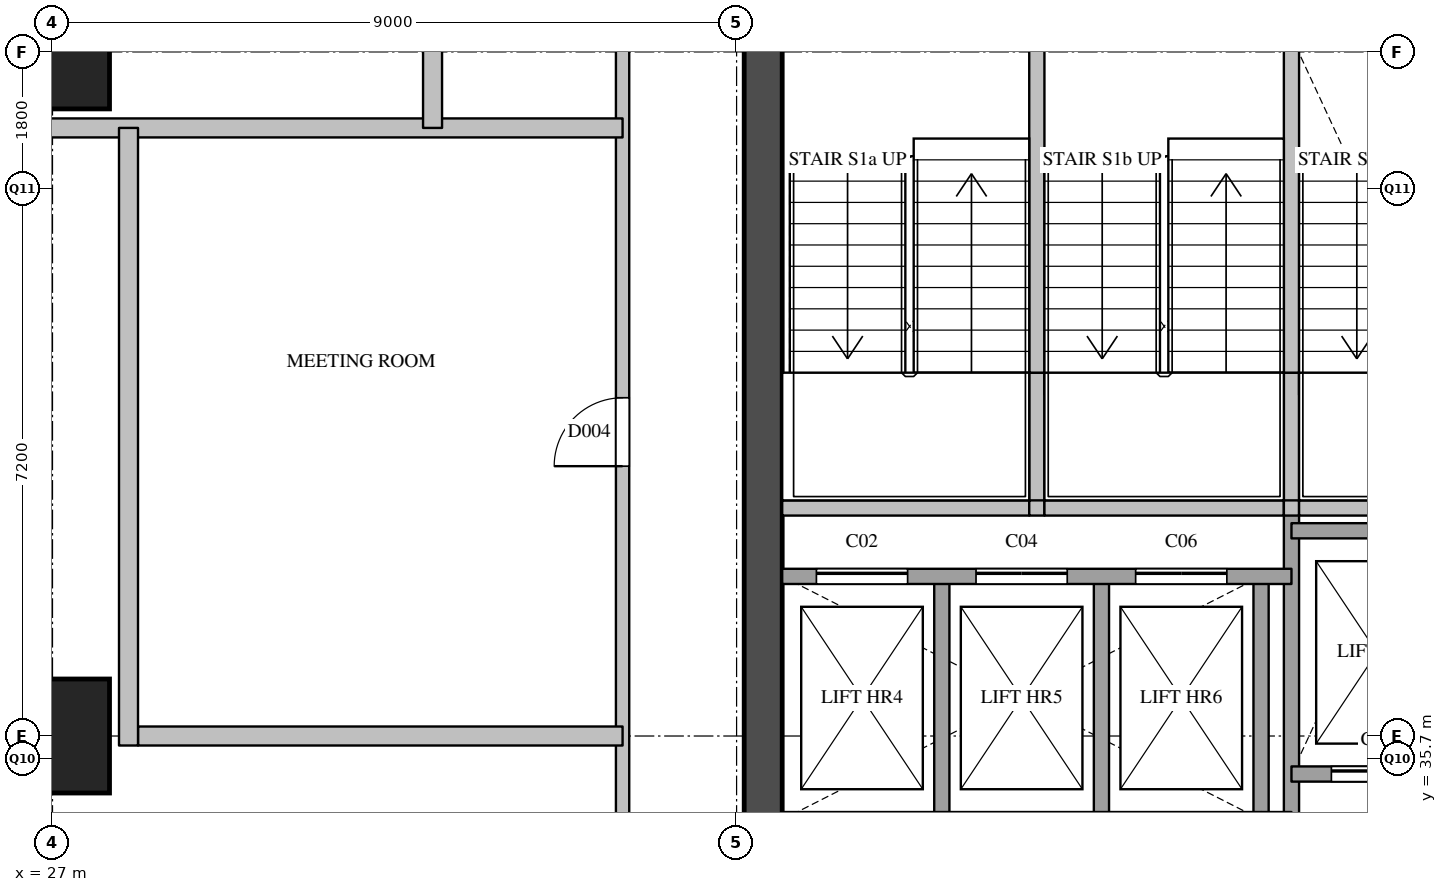
"""IFC4 building model, lengths in metres.
Left out: names, types, materials, properties, quantities, classifications, styles, units other than length and angle.
Written with IfcOpenShell. Run it as: python <this file> out.ifc"""

import sys

from ifc_helpers import new_model, si_unit, direction, frame, frame_2d, origin, origin_2d, place, context, subcontext, project, spatial, rectangle, extrude, element, fill, save


model = new_model("IFC4")
c1 = context("Model", 3, precision=1e-05, world=origin(), true_north=direction((0.0, 1.0)))
c2 = subcontext(c1, "Body", "Model", "MODEL_VIEW")
j1 = project(units=[si_unit("LENGTHUNIT", "METRE"), si_unit("PLANEANGLEUNIT", "RADIAN")], contexts=[c1])
p1 = place(None, origin())
s1 = spatial("IfcSite", under=j1, at=p1, CompositionType="ELEMENT")
p2 = place(p1, origin())
s2 = spatial("IfcBuilding", under=s1, at=p2, CompositionType="ELEMENT")
p3 = place(p2, frame((0.0, 0.0, 138.8)))
s3 = spatial("IfcBuildingStorey", under=s2, at=p3, CompositionType="ELEMENT", Elevation=138.8)
for number, where, z_axis, x_axis in (
    (1, (27.0, 36.0, 0.0), (0.0, 0.0, 1.0), (1.0, 0.0, 0.0)),
    (2, (27.0, 45.0, 0.0), (0.0, 0.0, 1.0), (1.0, 0.0, 0.0)),
):
    element("IfcColumn", number, at=place(p3, frame(where, z_axis=z_axis, x_axis=x_axis)), inside=s3, PredefinedType="COLUMN", context=c2, shape_type="SweptSolid", body=[
        extrude(rectangle(XDim=1.5, YDim=1.5, at=origin_2d()), origin(), (0.0, 0.0, 1.0), 3.9),
    ])
p4 = place(p3, frame((36.35, 29.1, 0.0), z_axis=(0.0, 0.0, 1.0), x_axis=(0.0, 1.0, 0.0)))
e3 = element("IfcWall", 3, at=p4, inside=s3, PredefinedType="SHEAR", context=c2, shape_type="SweptSolid", body=[
    extrude(rectangle(XDim=20.3, YDim=0.5, at=frame_2d((10.15, 0.0))), origin(), (0.0, 0.0, 1.0), 3.6),
])
p5 = place(p4, frame((3.6, 0.0, 0.0)))
e4 = element("IfcOpeningElement", 4, at=p5, cuts=e3, PredefinedType="OPENING", context=c2, shape_type="SweptSolid", body=[
    extrude(rectangle(XDim=1.8, YDim=2.1, at=frame_2d((0.9, 1.05))), frame((0.0, 0.26, 0.0), z_axis=(0.0, -1.0, 0.0), x_axis=(1.0, 0.0, 0.0)), (0.0, 0.0, 1.0), 0.52),
])
p6 = place(p4, frame((16.4, 0.0, 0.0)))
e5 = element("IfcOpeningElement", 5, at=p6, cuts=e3, PredefinedType="OPENING", context=c2, shape_type="SweptSolid", body=[
    extrude(rectangle(XDim=1.0, YDim=2.1, at=frame_2d((0.5, 1.05))), frame((0.0, 0.26, 0.0), z_axis=(0.0, -1.0, 0.0), x_axis=(1.0, 0.0, 0.0)), (0.0, 0.0, 1.0), 0.52),
])
p7 = place(p3, frame((38.7, 34.9, 0.0), z_axis=(0.0, 0.0, 1.0), x_axis=(0.0, 1.0, 0.0)))
e6 = element("IfcWall", 6, at=p7, inside=s3, PredefinedType="SOLIDWALL", context=c2, shape_type="SweptSolid", body=[
    extrude(rectangle(XDim=3.2, YDim=0.2, at=frame_2d((1.6, 0.0))), origin(), (0.0, 0.0, 1.0), 3.6),
])
p8 = place(p3, frame((39.95, 39.0, 0.0), z_axis=(0.0, 0.0, 1.0), x_axis=(0.0, 1.0, 0.0)))
e7 = element("IfcWall", 7, at=p8, inside=s3, PredefinedType="SOLIDWALL", context=c2, shape_type="SweptSolid", body=[
    extrude(rectangle(XDim=1.78, YDim=0.2, at=frame_2d((0.89, 0.0))), origin(), (0.0, 0.0, 1.0), 3.6),
])
p9 = place(p3, frame((39.95, 40.78, 0.0), z_axis=(0.0, 0.0, 1.0), x_axis=(0.0, 1.0, 0.0)))
e8 = element("IfcWall", 8, at=p9, inside=s3, PredefinedType="SOLIDWALL", context=c2, shape_type="SweptSolid", body=[
    extrude(rectangle(XDim=4.42, YDim=0.2, at=frame_2d((2.21, 0.0))), origin(), (0.0, 0.0, 1.0), 3.6),
])
for number, where, z_axis, x_axis in (
    (9, (40.8, 34.9, 0.0), (0.0, 0.0, 1.0), (0.0, 1.0, 0.0)),
    (10, (42.9, 34.9, 0.0), (0.0, 0.0, 1.0), (0.0, 1.0, 0.0)),
):
    element("IfcWall", number, at=place(p3, frame(where, z_axis=z_axis, x_axis=x_axis)), inside=s3, PredefinedType="SOLIDWALL", context=c2, shape_type="SweptSolid", body=[
        extrude(rectangle(XDim=3.2, YDim=0.2, at=frame_2d((1.6, 0.0))), origin(), (0.0, 0.0, 1.0), 3.6),
    ])
p10 = place(p3, frame((43.3, 29.1, 0.0), z_axis=(0.0, 0.0, 1.0), x_axis=(0.0, 1.0, 0.0)))
e11 = element("IfcWall", 11, at=p10, inside=s3, PredefinedType="SOLIDWALL", context=c2, shape_type="SweptSolid", body=[
    extrude(rectangle(XDim=9.9, YDim=0.2, at=frame_2d((4.95, 0.0))), origin(), (0.0, 0.0, 1.0), 3.6),
])
p11 = place(p3, frame((43.3, 39.0, 0.0), z_axis=(0.0, 0.0, 1.0), x_axis=(0.0, 1.0, 0.0)))
e12 = element("IfcWall", 12, at=p11, inside=s3, PredefinedType="SOLIDWALL", context=c2, shape_type="SweptSolid", body=[
    extrude(rectangle(XDim=1.78, YDim=0.2, at=frame_2d((0.89, 0.0))), origin(), (0.0, 0.0, 1.0), 3.6),
])
p12 = place(p3, frame((43.3, 40.78, 0.0), z_axis=(0.0, 0.0, 1.0), x_axis=(0.0, 1.0, 0.0)))
e13 = element("IfcWall", 13, at=p12, inside=s3, PredefinedType="SOLIDWALL", context=c2, shape_type="SweptSolid", body=[
    extrude(rectangle(XDim=4.42, YDim=0.2, at=frame_2d((2.21, 0.0))), origin(), (0.0, 0.0, 1.0), 3.6),
])
p13 = place(p3, frame((43.3, 35.5, 0.0), z_axis=(0.0, 0.0, 1.0), x_axis=(1.0, 0.0, 0.0)))
e14 = element("IfcWall", 14, at=p13, inside=s3, PredefinedType="SOLIDWALL", context=c2, shape_type="SweptSolid", body=[
    extrude(rectangle(XDim=4.5, YDim=0.2, at=frame_2d((2.25, 0.0))), origin(), (0.0, 0.0, 1.0), 3.6),
])
p14 = place(p13, frame((0.525, 0.0, 0.0)))
e15 = element("IfcOpeningElement", 15, at=p14, cuts=e14, PredefinedType="OPENING", context=c2, shape_type="SweptSolid", body=[
    extrude(rectangle(XDim=1.2, YDim=2.1, at=frame_2d((0.6, 1.05))), frame((0.0, 0.11, 0.0), z_axis=(0.0, -1.0, 0.0), x_axis=(1.0, 0.0, 0.0)), (0.0, 0.0, 1.0), 0.22),
])
p15 = place(p13, frame((3.025, 0.0, 0.0)))
e16 = element("IfcOpeningElement", 16, at=p15, cuts=e14, PredefinedType="OPENING", context=c2, shape_type="SweptSolid", body=[
    extrude(rectangle(XDim=0.7, YDim=2.1, at=frame_2d((0.35, 1.05))), frame((0.0, 0.11, 0.0), z_axis=(0.0, -1.0, 0.0), x_axis=(1.0, 0.0, 0.0)), (0.0, 0.0, 1.0), 0.22),
])
p16 = place(p3, frame((36.6, 38.1, 0.0), z_axis=(0.0, 0.0, 1.0), x_axis=(1.0, 0.0, 0.0)))
e17 = element("IfcWall", 17, at=p16, inside=s3, PredefinedType="SOLIDWALL", context=c2, shape_type="SweptSolid", body=[
    extrude(rectangle(XDim=6.7, YDim=0.2, at=frame_2d((3.35, 0.0))), origin(), (0.0, 0.0, 1.0), 3.6),
])
p17 = place(p16, frame((0.45, 0.0, 0.0)))
e18 = element("IfcOpeningElement", 18, at=p17, cuts=e17, PredefinedType="OPENING", context=c2, shape_type="SweptSolid", body=[
    extrude(rectangle(XDim=1.2, YDim=2.1, at=frame_2d((0.6, 1.05))), frame((0.0, 0.11, 0.0), z_axis=(0.0, -1.0, 0.0), x_axis=(1.0, 0.0, 0.0)), (0.0, 0.0, 1.0), 0.22),
])
p18 = place(p16, frame((2.55, 0.0, 0.0)))
e19 = element("IfcOpeningElement", 19, at=p18, cuts=e17, PredefinedType="OPENING", context=c2, shape_type="SweptSolid", body=[
    extrude(rectangle(XDim=1.2, YDim=2.1, at=frame_2d((0.6, 1.05))), frame((0.0, 0.11, 0.0), z_axis=(0.0, -1.0, 0.0), x_axis=(1.0, 0.0, 0.0)), (0.0, 0.0, 1.0), 0.22),
])
p19 = place(p16, frame((4.65, 0.0, 0.0)))
e20 = element("IfcOpeningElement", 20, at=p19, cuts=e17, PredefinedType="OPENING", context=c2, shape_type="SweptSolid", body=[
    extrude(rectangle(XDim=1.2, YDim=2.1, at=frame_2d((0.6, 1.05))), frame((0.0, 0.11, 0.0), z_axis=(0.0, -1.0, 0.0), x_axis=(1.0, 0.0, 0.0)), (0.0, 0.0, 1.0), 0.22),
])
p20 = place(p3, frame((43.3, 38.7, 0.0), z_axis=(0.0, 0.0, 1.0), x_axis=(1.0, 0.0, 0.0)))
e21 = element("IfcWall", 21, at=p20, inside=s3, PredefinedType="SOLIDWALL", context=c2, shape_type="SweptSolid", body=[
    extrude(rectangle(XDim=4.5, YDim=0.2, at=frame_2d((2.25, 0.0))), origin(), (0.0, 0.0, 1.0), 3.6),
])
p21 = place(p3, frame((36.6, 39.0, 0.0), z_axis=(0.0, 0.0, 1.0), x_axis=(1.0, 0.0, 0.0)))
e22 = element("IfcWall", 22, at=p21, inside=s3, PredefinedType="SOLIDWALL", context=c2, shape_type="SweptSolid", body=[
    extrude(rectangle(XDim=3.25, YDim=0.2, at=frame_2d((1.625, 0.0))), origin(), (0.0, 0.0, 1.0), 3.6),
])
p22 = place(p3, frame((39.85, 39.0, 0.0), z_axis=(0.0, 0.0, 1.0), x_axis=(1.0, 0.0, 0.0)))
e23 = element("IfcWall", 23, at=p22, inside=s3, PredefinedType="SOLIDWALL", context=c2, shape_type="SweptSolid", body=[
    extrude(rectangle(XDim=0.2, YDim=0.2, at=frame_2d((0.1, 0.0))), origin(), (0.0, 0.0, 1.0), 3.6),
])
p23 = place(p3, frame((40.05, 39.0, 0.0), z_axis=(0.0, 0.0, 1.0), x_axis=(1.0, 0.0, 0.0)))
e24 = element("IfcWall", 24, at=p23, inside=s3, PredefinedType="SOLIDWALL", context=c2, shape_type="SweptSolid", body=[
    extrude(rectangle(XDim=3.15, YDim=0.2, at=frame_2d((1.575, 0.0))), origin(), (0.0, 0.0, 1.0), 3.6),
])
p24 = place(p3, frame((43.2, 39.0, 0.0), z_axis=(0.0, 0.0, 1.0), x_axis=(1.0, 0.0, 0.0)))
e25 = element("IfcWall", 25, at=p24, inside=s3, PredefinedType="SOLIDWALL", context=c2, shape_type="SweptSolid", body=[
    extrude(rectangle(XDim=0.2, YDim=0.2, at=frame_2d((0.1, 0.0))), origin(), (0.0, 0.0, 1.0), 3.6),
])
p25 = place(p3, frame((43.4, 39.0, 0.0), z_axis=(0.0, 0.0, 1.0), x_axis=(1.0, 0.0, 0.0)))
e26 = element("IfcWall", 26, at=p25, inside=s3, PredefinedType="SOLIDWALL", context=c2, shape_type="SweptSolid", body=[
    extrude(rectangle(XDim=3.25, YDim=0.2, at=frame_2d((1.625, 0.0))), origin(), (0.0, 0.0, 1.0), 3.6),
])
p26 = place(p3, frame((34.5, 28.5, 0.0), z_axis=(0.0, 0.0, 1.0), x_axis=(0.0, 1.0, 0.0)))
e27 = element("IfcWall", 27, at=p26, inside=s3, PredefinedType="PARTITIONING", context=c2, shape_type="SweptSolid", body=[
    extrude(rectangle(XDim=23.0, YDim=0.175, at=frame_2d((11.5, 0.0))), origin(), (0.0, 0.0, 1.0), 3.6),
])
p27 = place(p26, frame((3.3, 0.0, 0.0)))
e28 = element("IfcOpeningElement", 28, at=p27, cuts=e27, PredefinedType="OPENING", context=c2, shape_type="SweptSolid", body=[
    extrude(rectangle(XDim=0.9, YDim=2.1, at=frame_2d((0.45, 1.05))), frame((0.0, 0.097, 0.0), z_axis=(0.0, -1.0, 0.0), x_axis=(1.0, 0.0, 0.0)), (0.0, 0.0, 1.0), 0.195),
])
p28 = place(p26, frame((11.05, 0.0, 0.0)))
e29 = element("IfcOpeningElement", 29, at=p28, cuts=e27, PredefinedType="OPENING", context=c2, shape_type="SweptSolid", body=[
    extrude(rectangle(XDim=0.9, YDim=2.1, at=frame_2d((0.45, 1.05))), frame((0.0, 0.097, 0.0), z_axis=(0.0, -1.0, 0.0), x_axis=(1.0, 0.0, 0.0)), (0.0, 0.0, 1.0), 0.195),
])
p29 = place(p26, frame((18.8, 0.0, 0.0)))
e30 = element("IfcOpeningElement", 30, at=p29, cuts=e27, PredefinedType="OPENING", context=c2, shape_type="SweptSolid", body=[
    extrude(rectangle(XDim=0.9, YDim=2.1, at=frame_2d((0.45, 1.05))), frame((0.0, 0.097, 0.0), z_axis=(0.0, -1.0, 0.0), x_axis=(1.0, 0.0, 0.0)), (0.0, 0.0, 1.0), 0.195),
])
p30 = place(p3, frame((28.125, 36.0, 0.0), z_axis=(0.0, 0.0, 1.0), x_axis=(1.0, 0.0, 0.0)))
e31 = element("IfcWall", 31, at=p30, inside=s3, PredefinedType="PARTITIONING", context=c2, shape_type="SweptSolid", body=[
    extrude(rectangle(XDim=6.375, YDim=0.25, at=frame_2d((3.188, 0.0))), origin(), (0.0, 0.0, 1.0), 3.6),
])
p31 = place(p3, frame((19.5, 44.0, 0.0), z_axis=(0.0, 0.0, 1.0), x_axis=(1.0, 0.0, 0.0)))
e32 = element("IfcWall", 32, at=p31, inside=s3, PredefinedType="PARTITIONING", context=c2, shape_type="SweptSolid", body=[
    extrude(rectangle(XDim=15.0, YDim=0.25, at=frame_2d((7.5, 0.0))), origin(), (0.0, 0.0, 1.0), 2.6),
])
p32 = place(p3, frame((28.0, 35.875, 0.0), z_axis=(0.0, 0.0, 1.0), x_axis=(0.0, 1.0, 0.0)))
e33 = element("IfcWall", 33, at=p32, inside=s3, PredefinedType="PARTITIONING", context=c2, shape_type="SweptSolid", body=[
    extrude(rectangle(XDim=8.125, YDim=0.25, at=frame_2d((4.062, 0.0))), origin(), (0.0, 0.0, 1.0), 3.6),
])
p33 = place(p3, frame((32.0, 44.0, 0.0), z_axis=(0.0, 0.0, 1.0), x_axis=(0.0, 1.0, 0.0)))
e34 = element("IfcWall", 34, at=p33, inside=s3, PredefinedType="PARTITIONING", context=c2, shape_type="SweptSolid", body=[
    extrude(rectangle(XDim=10.0, YDim=0.25, at=frame_2d((5.0, 0.0))), origin(), (0.0, 0.0, 1.0), 2.6),
])
p34 = place(p17, origin())
e35 = element("IfcDoor", 35, at=p34, inside=s3, OperationType="SLIDING_TO_LEFT", PredefinedType="DOOR", context=c2, shape_type="SweptSolid", body=[
    extrude(rectangle(XDim=1.2, YDim=2.1, at=frame_2d((0.6, 1.05))), frame((0.0, 0.025, 0.0), z_axis=(0.0, -1.0, 0.0), x_axis=(1.0, 0.0, 0.0)), (0.0, 0.0, 1.0), 0.05),
])
fill(e18, e35)
p35 = place(p18, origin())
e36 = element("IfcDoor", 36, at=p35, inside=s3, OperationType="SLIDING_TO_LEFT", PredefinedType="DOOR", context=c2, shape_type="SweptSolid", body=[
    extrude(rectangle(XDim=1.2, YDim=2.1, at=frame_2d((0.6, 1.05))), frame((0.0, 0.025, 0.0), z_axis=(0.0, -1.0, 0.0), x_axis=(1.0, 0.0, 0.0)), (0.0, 0.0, 1.0), 0.05),
])
fill(e19, e36)
p36 = place(p19, origin())
e37 = element("IfcDoor", 37, at=p36, inside=s3, OperationType="SLIDING_TO_LEFT", PredefinedType="DOOR", context=c2, shape_type="SweptSolid", body=[
    extrude(rectangle(XDim=1.2, YDim=2.1, at=frame_2d((0.6, 1.05))), frame((0.0, 0.025, 0.0), z_axis=(0.0, -1.0, 0.0), x_axis=(1.0, 0.0, 0.0)), (0.0, 0.0, 1.0), 0.05),
])
fill(e20, e37)
p37 = place(p14, origin())
e38 = element("IfcDoor", 38, at=p37, inside=s3, OperationType="SLIDING_TO_LEFT", PredefinedType="DOOR", context=c2, shape_type="SweptSolid", body=[
    extrude(rectangle(XDim=1.2, YDim=2.1, at=frame_2d((0.6, 1.05))), frame((0.0, 0.025, 0.0), z_axis=(0.0, -1.0, 0.0), x_axis=(1.0, 0.0, 0.0)), (0.0, 0.0, 1.0), 0.05),
])
fill(e15, e38)
p38 = place(p28, origin())
e39 = element("IfcDoor", 39, at=p38, inside=s3, OperationType="SINGLE_SWING_LEFT", PredefinedType="DOOR", context=c2, shape_type="SweptSolid", body=[
    extrude(rectangle(XDim=0.9, YDim=2.1, at=frame_2d((0.45, 1.05))), frame((0.0, 0.025, 0.0), z_axis=(0.0, -1.0, 0.0), x_axis=(1.0, 0.0, 0.0)), (0.0, 0.0, 1.0), 0.05),
])
fill(e29, e39)
save(model, sys.argv[1])
